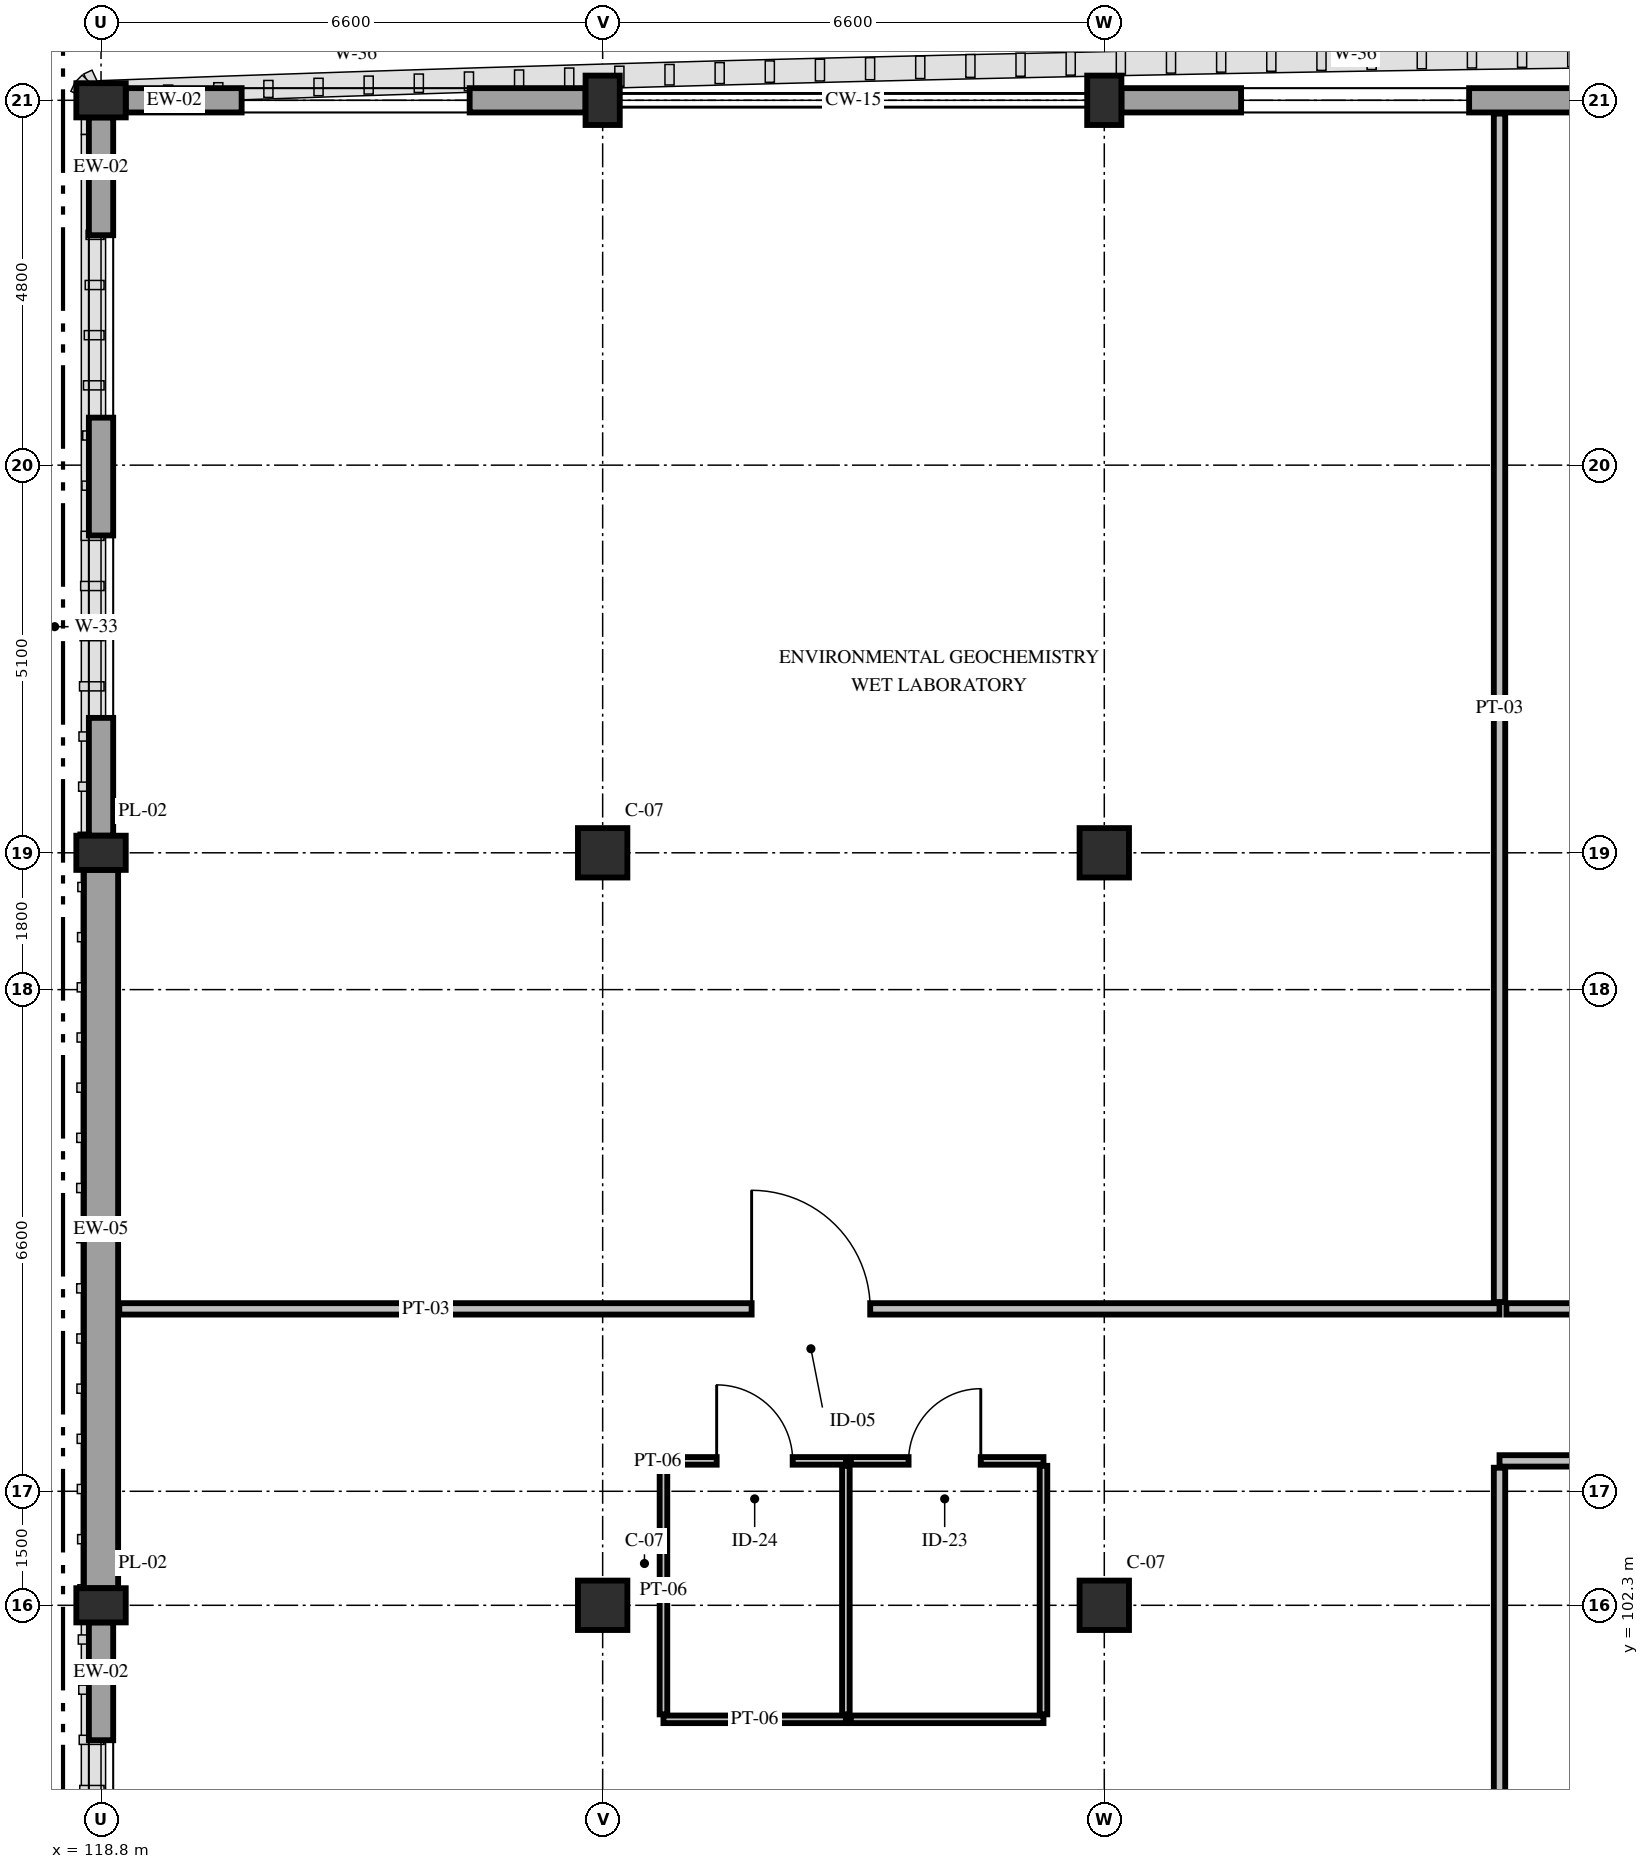
"""IFC4 building model, lengths in metres.
Left out: names, types, materials, properties, quantities, classifications, styles, units other than length and angle.
Written with IfcOpenShell. Run it as: python <this file> out.ifc"""

import sys

from ifc_helpers import new_model, si_unit, direction, frame, frame_2d, origin, origin_2d, place, context, subcontext, project, spatial, rectangle, extrude, element, fill, save


model = new_model("IFC4")
c1 = context("Model", 3, precision=1e-05, world=origin(), true_north=direction((0.0, 1.0)))
c2 = subcontext(c1, "Body", "Model", "MODEL_VIEW")
j1 = project(units=[si_unit("LENGTHUNIT", "METRE"), si_unit("PLANEANGLEUNIT", "RADIAN")], contexts=[c1])
p1 = place(None, origin())
s1 = spatial("IfcSite", under=j1, at=p1, CompositionType="ELEMENT")
p2 = place(p1, origin())
s2 = spatial("IfcBuilding", under=s1, at=p2, CompositionType="ELEMENT")
p3 = place(p2, frame((0.0, 0.0, 19.8)))
s3 = spatial("IfcBuildingStorey", under=s2, at=p3, CompositionType="ELEMENT", Elevation=19.8)
for number, where, z_axis, x_axis in (
    (1, (118.8, 102.3, 0.0), (0.0, 0.0, 1.0), (0.0, 1.0, 0.0)),
    (2, (118.8, 112.2, 0.0), (0.0, 0.0, 1.0), (0.0, 1.0, 0.0)),
    (3, (118.8, 122.1, 0.0), (0.0, 0.0, 1.0), (0.0, 1.0, 0.0)),
):
    element("IfcColumn", number, at=place(p3, frame(where, z_axis=z_axis, x_axis=x_axis)), inside=s3, PredefinedType="PILASTER", context=c2, shape_type="SweptSolid", body=[
        extrude(rectangle(XDim=0.45, YDim=0.65, at=origin_2d()), origin(), (0.0, 0.0, 1.0), 4.8),
    ])
for number, where, z_axis, x_axis in (
    (4, (125.4, 102.3, 0.0), (0.0, 0.0, 1.0), (1.0, 0.0, 0.0)),
    (5, (125.4, 112.2, 0.0), (0.0, 0.0, 1.0), (1.0, 0.0, 0.0)),
):
    element("IfcColumn", number, at=place(p3, frame(where, z_axis=z_axis, x_axis=x_axis)), inside=s3, PredefinedType="COLUMN", context=c2, shape_type="SweptSolid", body=[
        extrude(rectangle(XDim=0.65, YDim=0.65, at=origin_2d()), origin(), (0.0, 0.0, 1.0), 4.8),
    ])
p4 = place(p3, frame((125.4, 122.1, 0.0), z_axis=(0.0, 0.0, 1.0), x_axis=(1.0, 0.0, 0.0)))
e6 = element("IfcColumn", 6, at=p4, inside=s3, PredefinedType="PILASTER", context=c2, shape_type="SweptSolid", body=[
    extrude(rectangle(XDim=0.45, YDim=0.65, at=origin_2d()), origin(), (0.0, 0.0, 1.0), 4.8),
])
for number, where, z_axis, x_axis in (
    (7, (132.0, 102.3, 0.0), (0.0, 0.0, 1.0), (1.0, 0.0, 0.0)),
    (8, (132.0, 112.2, 0.0), (0.0, 0.0, 1.0), (1.0, 0.0, 0.0)),
):
    element("IfcColumn", number, at=place(p3, frame(where, z_axis=z_axis, x_axis=x_axis)), inside=s3, PredefinedType="COLUMN", context=c2, shape_type="SweptSolid", body=[
        extrude(rectangle(XDim=0.65, YDim=0.65, at=origin_2d()), origin(), (0.0, 0.0, 1.0), 4.8),
    ])
p5 = place(p3, frame((132.0, 122.1, 0.0), z_axis=(0.0, 0.0, 1.0), x_axis=(1.0, 0.0, 0.0)))
e9 = element("IfcColumn", 9, at=p5, inside=s3, PredefinedType="PILASTER", context=c2, shape_type="SweptSolid", body=[
    extrude(rectangle(XDim=0.45, YDim=0.65, at=origin_2d()), origin(), (0.0, 0.0, 1.0), 4.8),
])
p6 = place(p3, frame((118.8, 92.625, 0.0), z_axis=(0.0, 0.0, 1.0), x_axis=(0.0, 1.0, 0.0)))
e10 = element("IfcWall", 10, at=p6, inside=s3, PredefinedType="STANDARD", context=c2, shape_type="SweptSolid", body=[
    extrude(rectangle(XDim=9.45, YDim=0.32, at=frame_2d((4.725, 0.0))), origin(), (0.0, 0.0, 1.0), 3.95),
])
p7 = place(p6, frame((1.55, 0.0, 0.85)))
e11 = element("IfcOpeningElement", 11, at=p7, cuts=e10, PredefinedType="OPENING", context=c2, shape_type="SweptSolid", body=[
    extrude(rectangle(XDim=2.4, YDim=1.88, at=frame_2d((1.2, 0.94))), frame((0.0, 0.175, 0.0), z_axis=(0.0, -1.0, 0.0), x_axis=(1.0, 0.0, 0.0)), (0.0, 0.0, 1.0), 0.35),
])
p8 = place(p6, frame((5.5, 0.0, 0.85)))
e12 = element("IfcOpeningElement", 12, at=p8, cuts=e10, PredefinedType="OPENING", context=c2, shape_type="SweptSolid", body=[
    extrude(rectangle(XDim=2.4, YDim=1.88, at=frame_2d((1.2, 0.94))), frame((0.0, 0.175, 0.0), z_axis=(0.0, -1.0, 0.0), x_axis=(1.0, 0.0, 0.0)), (0.0, 0.0, 1.0), 0.35),
])
p9 = place(p3, frame((118.8, 102.525, 0.0), z_axis=(0.0, 0.0, 1.0), x_axis=(0.0, 1.0, 0.0)))
e13 = element("IfcWall", 13, at=p9, inside=s3, PredefinedType="SOLIDWALL", context=c2, shape_type="SweptSolid", body=[
    extrude(rectangle(XDim=9.45, YDim=0.45, at=frame_2d((4.725, 0.0))), origin(), (0.0, 0.0, 1.0), 3.95),
])
p10 = place(p3, frame((118.8, 112.425, 0.0), z_axis=(0.0, 0.0, 1.0), x_axis=(0.0, 1.0, 0.0)))
e14 = element("IfcWall", 14, at=p10, inside=s3, PredefinedType="STANDARD", context=c2, shape_type="SweptSolid", body=[
    extrude(rectangle(XDim=9.45, YDim=0.32, at=frame_2d((4.725, 0.0))), origin(), (0.0, 0.0, 1.0), 3.95),
])
p11 = place(p10, frame((1.55, 0.0, 0.85)))
e15 = element("IfcOpeningElement", 15, at=p11, cuts=e14, PredefinedType="OPENING", context=c2, shape_type="SweptSolid", body=[
    extrude(rectangle(XDim=2.4, YDim=1.88, at=frame_2d((1.2, 0.94))), frame((0.0, 0.175, 0.0), z_axis=(0.0, -1.0, 0.0), x_axis=(1.0, 0.0, 0.0)), (0.0, 0.0, 1.0), 0.35),
])
p12 = place(p10, frame((5.5, 0.0, 0.85)))
e16 = element("IfcOpeningElement", 16, at=p12, cuts=e14, PredefinedType="OPENING", context=c2, shape_type="SweptSolid", body=[
    extrude(rectangle(XDim=2.4, YDim=1.88, at=frame_2d((1.2, 0.94))), frame((0.0, 0.175, 0.0), z_axis=(0.0, -1.0, 0.0), x_axis=(1.0, 0.0, 0.0)), (0.0, 0.0, 1.0), 0.35),
])
p13 = place(p3, frame((119.125, 122.1, 0.0), z_axis=(0.0, 0.0, 1.0), x_axis=(1.0, 0.0, 0.0)))
e17 = element("IfcWall", 17, at=p13, inside=s3, PredefinedType="STANDARD", context=c2, shape_type="SweptSolid", body=[
    extrude(rectangle(XDim=6.05, YDim=0.32, at=frame_2d((3.025, 0.0))), origin(), (0.0, 0.0, 1.0), 3.78),
])
p14 = place(p13, frame((1.525, 0.0, 0.85)))
e18 = element("IfcOpeningElement", 18, at=p14, cuts=e17, PredefinedType="OPENING", context=c2, shape_type="SweptSolid", body=[
    extrude(rectangle(XDim=3.0, YDim=1.88, at=frame_2d((1.5, 0.94))), frame((0.0, 0.175, 0.0), z_axis=(0.0, -1.0, 0.0), x_axis=(1.0, 0.0, 0.0)), (0.0, 0.0, 1.0), 0.35),
])
p15 = place(p3, frame((132.225, 122.1, 0.0), z_axis=(0.0, 0.0, 1.0), x_axis=(1.0, 0.0, 0.0)))
e19 = element("IfcWall", 19, at=p15, inside=s3, PredefinedType="STANDARD", context=c2, shape_type="SweptSolid", body=[
    extrude(rectangle(XDim=6.15, YDim=0.32, at=frame_2d((3.075, 0.0))), origin(), (0.0, 0.0, 1.0), 3.78),
])
p16 = place(p15, frame((1.575, 0.0, 0.85)))
e20 = element("IfcOpeningElement", 20, at=p16, cuts=e19, PredefinedType="OPENING", context=c2, shape_type="SweptSolid", body=[
    extrude(rectangle(XDim=3.0, YDim=1.88, at=frame_2d((1.5, 0.94))), frame((0.0, 0.175, 0.0), z_axis=(0.0, -1.0, 0.0), x_axis=(1.0, 0.0, 0.0)), (0.0, 0.0, 1.0), 0.35),
])
p17 = place(p3, frame((126.2, 100.8, 0.0), z_axis=(0.0, 0.0, 1.0), x_axis=(1.0, 0.0, 0.0)))
e21 = element("IfcWall", 21, at=p17, inside=s3, PredefinedType="PARTITIONING", context=c2, shape_type="SweptSolid", body=[
    extrude(rectangle(XDim=2.4, YDim=0.1, at=frame_2d((1.2, 0.0))), origin(), (0.0, 0.0, 1.0), 4.46),
])
p18 = place(p3, frame((126.2, 104.2, 0.0), z_axis=(0.0, 0.0, 1.0), x_axis=(1.0, 0.0, 0.0)))
e22 = element("IfcWall", 22, at=p18, inside=s3, PredefinedType="PARTITIONING", context=c2, shape_type="SweptSolid", body=[
    extrude(rectangle(XDim=2.4, YDim=0.1, at=frame_2d((1.2, 0.0))), origin(), (0.0, 0.0, 1.0), 4.245),
])
p19 = place(p18, frame((0.7, 0.0, 0.0)))
e23 = element("IfcOpeningElement", 23, at=p19, cuts=e22, PredefinedType="OPENING", context=c2, shape_type="SweptSolid", body=[
    extrude(rectangle(XDim=1.0, YDim=2.15, at=frame_2d((0.5, 1.075))), frame((0.0, 0.065, 0.0), z_axis=(0.0, -1.0, 0.0), x_axis=(1.0, 0.0, 0.0)), (0.0, 0.0, 1.0), 0.13),
])
for number, where, z_axis, x_axis in (
    (24, (126.2, 100.865, 0.0), (0.0, 0.0, 1.0), (0.0, 1.0, 0.0)),
    (25, (128.6, 100.865, 0.0), (0.0, 0.0, 1.0), (0.0, 1.0, 0.0)),
):
    element("IfcWall", number, at=place(p3, frame(where, z_axis=z_axis, x_axis=x_axis)), inside=s3, PredefinedType="PARTITIONING", context=c2, shape_type="SweptSolid", body=[
        extrude(rectangle(XDim=3.27, YDim=0.1, at=frame_2d((1.635, 0.0))), origin(), (0.0, 0.0, 1.0), 4.065),
    ])
p20 = place(p3, frame((128.665, 100.8, 0.0), z_axis=(0.0, 0.0, 1.0), x_axis=(1.0, 0.0, 0.0)))
e26 = element("IfcWall", 26, at=p20, inside=s3, PredefinedType="PARTITIONING", context=c2, shape_type="SweptSolid", body=[
    extrude(rectangle(XDim=2.535, YDim=0.1, at=frame_2d((1.268, 0.0))), origin(), (0.0, 0.0, 1.0), 4.46),
])
p21 = place(p3, frame((128.665, 104.2, 0.0), z_axis=(0.0, 0.0, 1.0), x_axis=(1.0, 0.0, 0.0)))
e27 = element("IfcWall", 27, at=p21, inside=s3, PredefinedType="PARTITIONING", context=c2, shape_type="SweptSolid", body=[
    extrude(rectangle(XDim=2.535, YDim=0.1, at=frame_2d((1.268, 0.0))), origin(), (0.0, 0.0, 1.0), 4.245),
])
p22 = place(p21, frame((0.76, 0.0, 0.0)))
e28 = element("IfcOpeningElement", 28, at=p22, cuts=e27, PredefinedType="OPENING", context=c2, shape_type="SweptSolid", body=[
    extrude(rectangle(XDim=0.95, YDim=2.15, at=frame_2d((0.475, 1.075))), frame((0.0, 0.065, 0.0), z_axis=(0.0, -1.0, 0.0), x_axis=(1.0, 0.0, 0.0)), (0.0, 0.0, 1.0), 0.13),
])
p23 = place(p3, frame((131.2, 100.865, 0.0), z_axis=(0.0, 0.0, 1.0), x_axis=(0.0, 1.0, 0.0)))
e29 = element("IfcWall", 29, at=p23, inside=s3, PredefinedType="PARTITIONING", context=c2, shape_type="SweptSolid", body=[
    extrude(rectangle(XDim=3.27, YDim=0.1, at=frame_2d((1.635, 0.0))), origin(), (0.0, 0.0, 1.0), 4.065),
])
p24 = place(p3, frame((119.04, 106.2, 0.0), z_axis=(0.0, 0.0, 1.0), x_axis=(1.0, 0.0, 0.0)))
e30 = element("IfcWall", 30, at=p24, inside=s3, PredefinedType="PARTITIONING", context=c2, shape_type="SweptSolid", body=[
    extrude(rectangle(XDim=18.16, YDim=0.15, at=frame_2d((9.08, 0.0))), origin(), (0.0, 0.0, 1.0), 3.78),
])
p25 = place(p24, frame((8.32, 0.0, 0.0)))
e31 = element("IfcOpeningElement", 31, at=p25, cuts=e30, PredefinedType="OPENING", context=c2, shape_type="SweptSolid", body=[
    extrude(rectangle(XDim=1.56, YDim=2.3, at=frame_2d((0.78, 1.15))), frame((0.0, 0.09, 0.0), z_axis=(0.0, -1.0, 0.0), x_axis=(1.0, 0.0, 0.0)), (0.0, 0.0, 1.0), 0.18),
])
p26 = place(p3, frame((137.2, 106.29, 0.0), z_axis=(0.0, 0.0, 1.0), x_axis=(0.0, 1.0, 0.0)))
e32 = element("IfcWall", 32, at=p26, inside=s3, PredefinedType="PARTITIONING", context=c2, shape_type="SweptSolid", body=[
    extrude(rectangle(XDim=15.635, YDim=0.15, at=frame_2d((7.817, 0.0))), origin(), (0.0, 0.0, 1.0), 3.93),
])
p27 = place(p3, frame((137.29, 106.2, 0.0), z_axis=(0.0, 0.0, 1.0), x_axis=(1.0, 0.0, 0.0)))
e33 = element("IfcWall", 33, at=p27, inside=s3, PredefinedType="PARTITIONING", context=c2, shape_type="SweptSolid", body=[
    extrude(rectangle(XDim=26.31, YDim=0.15, at=frame_2d((13.155, 0.0))), origin(), (0.0, 0.0, 1.0), 3.78),
])
p28 = place(p27, frame((12.36, 0.0, 0.0)))
e34 = element("IfcOpeningElement", 34, at=p28, cuts=e33, PredefinedType="OPENING", context=c2, shape_type="SweptSolid", body=[
    extrude(rectangle(XDim=1.5, YDim=2.25, at=frame_2d((0.75, 1.125))), frame((0.0, 0.09, 0.0), z_axis=(0.0, -1.0, 0.0), x_axis=(1.0, 0.0, 0.0)), (0.0, 0.0, 1.0), 0.18),
])
p29 = place(p3, frame((137.2, 104.2, 0.0), z_axis=(0.0, 0.0, 1.0), x_axis=(1.0, 0.0, 0.0)))
e35 = element("IfcWall", 35, at=p29, inside=s3, PredefinedType="PARTITIONING", context=c2, shape_type="SweptSolid", body=[
    extrude(rectangle(XDim=11.2, YDim=0.15, at=frame_2d((5.6, 0.0))), origin(), (0.0, 0.0, 1.0), 3.78),
])
p30 = place(p29, frame((4.82, 0.0, 0.0)))
e36 = element("IfcOpeningElement", 36, at=p30, cuts=e35, PredefinedType="OPENING", context=c2, shape_type="SweptSolid", body=[
    extrude(rectangle(XDim=1.56, YDim=2.3, at=frame_2d((0.78, 1.15))), frame((0.0, 0.09, 0.0), z_axis=(0.0, -1.0, 0.0), x_axis=(1.0, 0.0, 0.0)), (0.0, 0.0, 1.0), 0.18),
])
p31 = place(p3, frame((137.2, 92.44, 0.0), z_axis=(0.0, 0.0, 1.0), x_axis=(0.0, 1.0, 0.0)))
e37 = element("IfcWall", 37, at=p31, inside=s3, PredefinedType="PARTITIONING", context=c2, shape_type="SweptSolid", body=[
    extrude(rectangle(XDim=11.67, YDim=0.15, at=frame_2d((5.835, 0.0))), origin(), (0.0, 0.0, 1.0), 3.93),
])
p32 = place(p8, origin())
e38 = element("IfcWindow", 38, at=p32, inside=s3, PartitioningType="DOUBLE_PANEL_VERTICAL", PredefinedType="WINDOW", context=c2, shape_type="SweptSolid", body=[
    extrude(rectangle(XDim=2.4, YDim=1.88, at=frame_2d((1.2, 0.94))), frame((0.0, 0.03, 0.0), z_axis=(0.0, -1.0, 0.0), x_axis=(1.0, 0.0, 0.0)), (0.0, 0.0, 1.0), 0.06),
])
fill(e12, e38)
p33 = place(p11, origin())
e39 = element("IfcWindow", 39, at=p33, inside=s3, PartitioningType="DOUBLE_PANEL_VERTICAL", PredefinedType="WINDOW", context=c2, shape_type="SweptSolid", body=[
    extrude(rectangle(XDim=2.4, YDim=1.88, at=frame_2d((1.2, 0.94))), frame((0.0, 0.03, 0.0), z_axis=(0.0, -1.0, 0.0), x_axis=(1.0, 0.0, 0.0)), (0.0, 0.0, 1.0), 0.06),
])
fill(e15, e39)
p34 = place(p12, origin())
e40 = element("IfcWindow", 40, at=p34, inside=s3, PartitioningType="DOUBLE_PANEL_VERTICAL", PredefinedType="WINDOW", context=c2, shape_type="SweptSolid", body=[
    extrude(rectangle(XDim=2.4, YDim=1.88, at=frame_2d((1.2, 0.94))), frame((0.0, 0.03, 0.0), z_axis=(0.0, -1.0, 0.0), x_axis=(1.0, 0.0, 0.0)), (0.0, 0.0, 1.0), 0.06),
])
fill(e16, e40)
p35 = place(p14, origin())
e41 = element("IfcWindow", 41, at=p35, inside=s3, PartitioningType="DOUBLE_PANEL_VERTICAL", PredefinedType="WINDOW", context=c2, shape_type="SweptSolid", body=[
    extrude(rectangle(XDim=3.0, YDim=1.88, at=frame_2d((1.5, 0.94))), frame((0.0, 0.03, 0.0), z_axis=(0.0, -1.0, 0.0), x_axis=(1.0, 0.0, 0.0)), (0.0, 0.0, 1.0), 0.06),
])
fill(e18, e41)
p36 = place(p16, origin())
e42 = element("IfcWindow", 42, at=p36, inside=s3, PartitioningType="DOUBLE_PANEL_VERTICAL", PredefinedType="WINDOW", context=c2, shape_type="SweptSolid", body=[
    extrude(rectangle(XDim=3.0, YDim=1.88, at=frame_2d((1.5, 0.94))), frame((0.0, 0.03, 0.0), z_axis=(0.0, -1.0, 0.0), x_axis=(1.0, 0.0, 0.0)), (0.0, 0.0, 1.0), 0.06),
])
fill(e20, e42)
p37 = place(p19, origin())
e43 = element("IfcDoor", 43, at=p37, inside=s3, OperationType="SINGLE_SWING_LEFT", PredefinedType="DOOR", context=c2, shape_type="SweptSolid", body=[
    extrude(rectangle(XDim=1.0, YDim=2.15, at=frame_2d((0.5, 1.075))), frame((0.0, 0.025, 0.0), z_axis=(0.0, -1.0, 0.0), x_axis=(1.0, 0.0, 0.0)), (0.0, 0.0, 1.0), 0.05),
])
fill(e23, e43)
p38 = place(p22, origin())
e44 = element("IfcDoor", 44, at=p38, inside=s3, OperationType="SINGLE_SWING_RIGHT", PredefinedType="DOOR", context=c2, shape_type="SweptSolid", body=[
    extrude(rectangle(XDim=0.95, YDim=2.15, at=frame_2d((0.475, 1.075))), frame((0.0, 0.025, 0.0), z_axis=(0.0, -1.0, 0.0), x_axis=(1.0, 0.0, 0.0)), (0.0, 0.0, 1.0), 0.05),
])
fill(e28, e44)
p39 = place(p25, origin())
e45 = element("IfcDoor", 45, at=p39, inside=s3, OperationType="SINGLE_SWING_LEFT", PredefinedType="DOOR", context=c2, shape_type="SweptSolid", body=[
    extrude(rectangle(XDim=1.56, YDim=2.3, at=frame_2d((0.78, 1.15))), frame((0.0, 0.025, 0.0), z_axis=(0.0, -1.0, 0.0), x_axis=(1.0, 0.0, 0.0)), (0.0, 0.0, 1.0), 0.05),
])
fill(e31, e45)
save(model, sys.argv[1])
